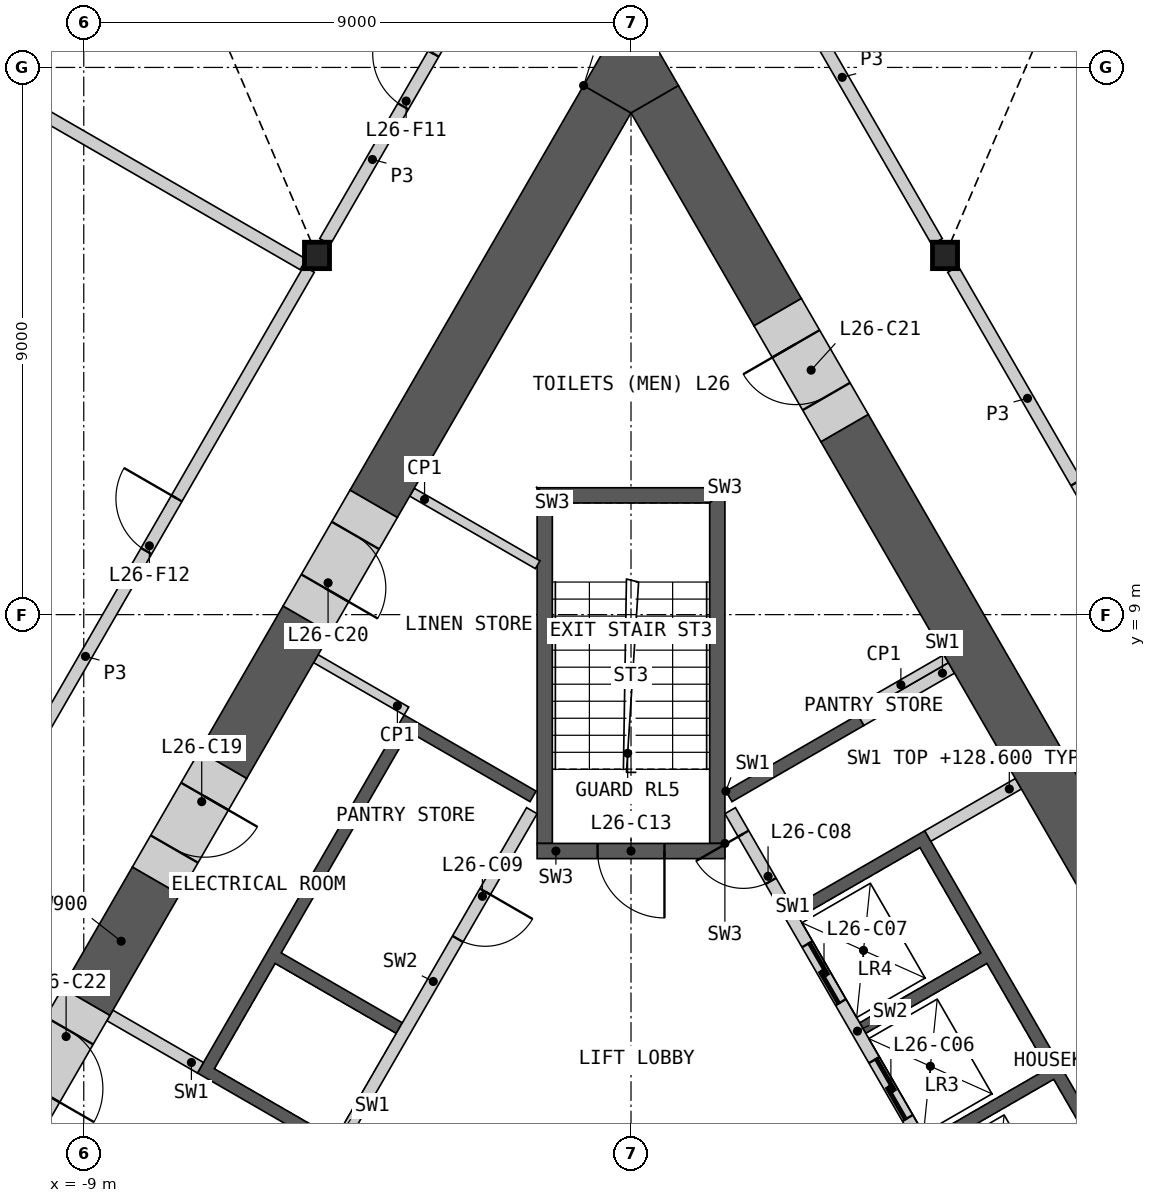
"""IFC4 building model, lengths in metres.
Left out: names, types, materials, properties, quantities, classifications, styles, units other than length and angle.
Written with IfcOpenShell. Run it as: python <this file> out.ifc"""

import sys

from ifc_helpers import new_model, si_unit, direction, frame, frame_2d, origin, origin_2d, place, context, subcontext, project, spatial, polyline, rectangle, i_section, outline, extrude, element, fill, save


model = new_model("IFC4")
c1 = context("Model", 3, precision=1e-05, world=origin(), true_north=direction((0.0, 1.0)))
c2 = subcontext(c1, "Body", "Model", "MODEL_VIEW")
j1 = project(units=[si_unit("LENGTHUNIT", "METRE"), si_unit("PLANEANGLEUNIT", "RADIAN")], contexts=[c1])
p1 = place(None, origin())
s1 = spatial("IfcSite", under=j1, at=p1, CompositionType="ELEMENT")
p2 = place(p1, origin())
s2 = spatial("IfcBuilding", under=s1, at=p2, CompositionType="ELEMENT")
p3 = place(p2, frame((0.0, 0.0, 124.8)))
s3 = spatial("IfcBuildingStorey", under=s2, at=p3, CompositionType="ELEMENT", Elevation=124.8)
for number, where, z_axis, x_axis in (
    (1, (-5.164, 14.908, 0.0), (0.0, 0.0, 1.0), (1.0, 0.0, 0.0)),
    (2, (5.164, 14.908, 0.0), (0.0, 0.0, 1.0), (1.0, 0.0, 0.0)),
):
    element("IfcColumn", number, at=place(p3, frame(where, z_axis=z_axis, x_axis=x_axis)), inside=s3, PredefinedType="COLUMN", context=c2, shape_type="SweptSolid", body=[
        extrude(i_section(OverallWidth=0.412, OverallDepth=0.435, WebThickness=0.036, FlangeThickness=0.057, at=origin_2d()), origin(), (0.0, 0.0, 1.0), 4.2),
    ])
p4 = place(p3, origin())
e3 = element("IfcWall", 3, at=p4, inside=s3, PredefinedType="SHEAR", context=c2, shape_type="SweptSolid", body=[
    extrude(outline(polyline([(1.561, 6.097), (3.731, 7.35), (3.831, 7.177), (1.66, 5.924), (1.561, 6.097)])), origin(), (0.0, 0.0, 1.0), 3.8),
])
p5 = place(p3, origin())
e4 = element("IfcWall", 4, at=p5, inside=s3, PredefinedType="SHEAR", context=c2, shape_type="SweptSolid", body=[
    extrude(outline(polyline([(2.66, 4.192), (4.831, 5.445), (8.231, -0.444), (6.061, -1.697), (5.96, -1.524), (7.952, -0.374), (6.952, 1.358), (4.96, 0.208), (4.861, 0.381), (6.852, 1.531), (5.852, 3.263), (3.861, 2.113), (3.76, 2.287), (5.752, 3.437), (4.752, 5.169), (2.76, 4.019), (2.66, 4.192)])), origin(), (0.0, 0.0, 1.0), 3.8),
])
p6 = place(p3, frame((5.817, -1.476, 0.0), z_axis=(0.0, 0.0, 1.0), x_axis=(-0.500002616675, 0.866023893041, 0.0)))
e5 = element("IfcWall", 5, at=p6, inside=s3, PredefinedType="SOLIDWALL", context=c2, shape_type="SweptSolid", body=[
    extrude(rectangle(XDim=8.373, YDim=0.2, at=frame_2d((4.187, 0.0))), origin(), (0.0, 0.0, 1.0), 3.8),
])
p7 = place(p6, frame((0.337, 0.0, 0.0)))
e6 = element("IfcOpeningElement", 6, at=p7, cuts=e5, PredefinedType="OPENING", context=c2, shape_type="SweptSolid", body=[
    extrude(rectangle(XDim=1.1, YDim=2.1, at=frame_2d((0.55, 1.05))), frame((0.0, 0.11, 0.0), z_axis=(0.0, -1.0, 0.0), x_axis=(1.0, 0.0, 0.0)), (0.0, 0.0, 1.0), 0.22),
])
p8 = place(p6, frame((2.537, 0.0, 0.0)))
e7 = element("IfcOpeningElement", 7, at=p8, cuts=e5, PredefinedType="OPENING", context=c2, shape_type="SweptSolid", body=[
    extrude(rectangle(XDim=1.1, YDim=2.1, at=frame_2d((0.55, 1.05))), frame((0.0, 0.11, 0.0), z_axis=(0.0, -1.0, 0.0), x_axis=(1.0, 0.0, 0.0)), (0.0, 0.0, 1.0), 0.22),
])
p9 = place(p6, frame((4.737, 0.0, 0.0)))
e8 = element("IfcOpeningElement", 8, at=p9, cuts=e5, PredefinedType="OPENING", context=c2, shape_type="SweptSolid", body=[
    extrude(rectangle(XDim=1.1, YDim=2.1, at=frame_2d((0.55, 1.05))), frame((0.0, 0.11, 0.0), z_axis=(0.0, -1.0, 0.0), x_axis=(1.0, 0.0, 0.0)), (0.0, 0.0, 1.0), 0.22),
])
p10 = place(p6, frame((7.037, 0.0, 0.0)))
e9 = element("IfcOpeningElement", 9, at=p10, cuts=e5, PredefinedType="OPENING", context=c2, shape_type="SweptSolid", body=[
    extrude(rectangle(XDim=0.9, YDim=2.1, at=frame_2d((0.45, 1.05))), frame((0.0, 0.11, 0.0), z_axis=(0.0, -1.0, 0.0), x_axis=(1.0, 0.0, 0.0)), (0.0, 0.0, 1.0), 0.22),
])
for number, where, z_axis, x_axis in (
    (10, (4.881, 5.358, 0.0), (0.0, 0.0, 1.0), (0.866, 0.5, 0.0)),
    (11, (3.781, 7.263, 0.0), (0.0, 0.0, 1.0), (0.866, 0.5, 0.0)),
):
    element("IfcWall", number, at=place(p3, frame(where, z_axis=z_axis, x_axis=x_axis)), inside=s3, PredefinedType="SHEAR", context=c2, shape_type="SweptSolid", body=[
        extrude(rectangle(XDim=1.72, YDim=0.2, at=frame_2d((0.86, 0.0))), origin(), (0.0, 0.0, 1.0), 3.8),
    ])
p11 = place(p3, origin())
e12 = element("IfcWall", 12, at=p11, inside=s3, PredefinedType="SHEAR", context=c2, shape_type="SweptSolid", body=[
    extrude(outline(polyline([(-4.96, 0.208), (-7.131, 1.461), (-3.731, 7.35), (-1.561, 6.097), (-1.66, 5.924), (-3.652, 7.074), (-5.752, 3.437), (-3.76, 2.287), (-3.861, 2.113), (-5.852, 3.263), (-6.852, 1.531), (-4.861, 0.381), (-4.96, 0.208)])), origin(), (0.0, 0.0, 1.0), 3.8),
])
p12 = place(p3, frame((-1.631, 5.776, 0.0), z_axis=(0.0, 0.0, 1.0), x_axis=(-0.499992876559, -0.866029516466, 0.0)))
e13 = element("IfcWall", 13, at=p12, inside=s3, PredefinedType="SOLIDWALL", context=c2, shape_type="SweptSolid", body=[
    extrude(rectangle(XDim=6.486, YDim=0.2, at=frame_2d((3.243, 0.0))), origin(), (0.0, 0.0, 1.0), 3.8),
])
p13 = place(p12, frame((1.537, 0.0, 0.0)))
e14 = element("IfcOpeningElement", 14, at=p13, cuts=e13, PredefinedType="OPENING", context=c2, shape_type="SweptSolid", body=[
    extrude(rectangle(XDim=0.9, YDim=2.1, at=frame_2d((0.45, 1.05))), frame((0.0, 0.11, 0.0), z_axis=(0.0, -1.0, 0.0), x_axis=(1.0, 0.0, 0.0)), (0.0, 0.0, 1.0), 0.22),
])
p14 = place(p3, frame((-7.081, 1.548, 0.0), z_axis=(0.0, 0.0, 1.0), x_axis=(-0.865963414263, 0.500107353632, 0.0)))
e15 = element("IfcWall", 15, at=p14, inside=s3, PredefinedType="SHEAR", context=c2, shape_type="SweptSolid", body=[
    extrude(rectangle(XDim=1.72, YDim=0.2, at=frame_2d((0.86, 0.0))), origin(), (0.0, 0.0, 1.0), 3.8),
])
p15 = place(p3, origin())
e16 = element("IfcWall", 16, at=p15, inside=s3, PredefinedType="SHEAR", context=c2, shape_type="SweptSolid", body=[
    extrude(outline(polyline([(1.544, 5.237), (1.544, 11.087), (1.294, 10.837), (1.294, 5.237), (1.544, 5.237)])), origin(), (0.0, 0.0, 1.0), 3.8),
])
p16 = place(p3, origin())
e17 = element("IfcWall", 17, at=p16, inside=s3, PredefinedType="SHEAR", context=c2, shape_type="SweptSolid", body=[
    extrude(outline(polyline([(1.544, 11.087), (-1.544, 11.087), (-1.294, 10.837), (1.294, 10.837), (1.544, 11.087)])), origin(), (0.0, 0.0, 1.0), 3.8),
])
p17 = place(p3, origin())
e18 = element("IfcWall", 18, at=p17, inside=s3, PredefinedType="SHEAR", context=c2, shape_type="SweptSolid", body=[
    extrude(outline(polyline([(-1.294, 10.837), (-1.544, 11.087), (-1.544, 5.237), (-1.294, 5.237), (-1.294, 10.837)])), origin(), (0.0, 0.0, 1.0), 3.8),
])
p18 = place(p3, frame((1.544, 5.112, 0.0), z_axis=(0.0, 0.0, 1.0), x_axis=(-1.0, 0.0, 0.0)))
e19 = element("IfcWall", 19, at=p18, inside=s3, PredefinedType="SHEAR", context=c2, shape_type="SweptSolid", body=[
    extrude(rectangle(XDim=3.088, YDim=0.25, at=frame_2d((1.544, 0.0))), origin(), (0.0, 0.0, 1.0), 3.8),
])
p19 = place(p18, frame((0.994, 0.0, 0.0)))
e20 = element("IfcOpeningElement", 20, at=p19, cuts=e19, PredefinedType="OPENING", context=c2, shape_type="SweptSolid", body=[
    extrude(rectangle(XDim=1.1, YDim=2.1, at=frame_2d((0.55, 1.05))), frame((0.0, 0.135, 0.0), z_axis=(0.0, -1.0, 0.0), x_axis=(1.0, 0.0, 0.0)), (0.0, 0.0, 1.0), 0.27),
])
for number, where, z_axis, x_axis in (
    (21, (3.693, 7.415, 0.0), (0.0, 0.0, 1.0), (0.866, 0.5, 0.0)),
    (22, (-3.693, 7.415, 0.0), (0.0, 0.0, 1.0), (-0.866, 0.5, 0.0)),
):
    element("IfcWall", number, at=place(p3, frame(where, z_axis=z_axis, x_axis=x_axis)), inside=s3, PredefinedType="PARTITIONING", context=c2, shape_type="SweptSolid", body=[
        extrude(rectangle(XDim=1.72, YDim=0.15, at=frame_2d((0.86, 0.0))), origin(), (0.0, 0.0, 1.0), 3.8),
    ])
p20 = place(p3, frame((-3.602, 11.014, 0.0), z_axis=(0.0, 0.0, 1.0), x_axis=(0.866011787705, -0.500023583, 0.0)))
e23 = element("IfcWall", 23, at=p20, inside=s3, PredefinedType="PARTITIONING", context=c2, shape_type="SweptSolid", body=[
    extrude(rectangle(XDim=2.386, YDim=0.15, at=frame_2d((1.193, 0.0))), origin(), (0.0, 0.0, 1.0), 3.8),
])
p21 = place(p3, frame((7.91, 4.451, 0.0), z_axis=(0.0, 0.0, 1.0), x_axis=(-0.500001962043, 0.866024270995, 0.0)))
e24 = element("IfcWall", 24, at=p21, inside=s3, PredefinedType="SHEAR", context=c2, shape_type="SweptSolid", body=[
    extrude(rectangle(XDim=8.796, YDim=0.9, at=frame_2d((4.398, 0.0))), origin(), (0.0, 0.0, 1.0), 3.8),
])
p22 = place(p3, frame((2.413, 13.974, 0.0), z_axis=(0.0, 0.0, 1.0), x_axis=(-0.500046330384, 0.865998653272, 0.0)))
e25 = element("IfcWall", 25, at=p22, inside=s3, PredefinedType="SHEAR", context=c2, shape_type="SweptSolid", body=[
    extrude(rectangle(XDim=4.045, YDim=0.9, at=frame_2d((2.023, 0.0))), origin(), (0.0, 0.0, 1.0), 3.8),
])
p23 = place(p3, frame((-0.39, 17.478, 0.0), z_axis=(0.0, 0.0, 1.0), x_axis=(-0.500010285023, -0.866019465642, 0.0)))
e26 = element("IfcWall", 26, at=p23, inside=s3, PredefinedType="SHEAR", context=c2, shape_type="SweptSolid", body=[
    extrude(rectangle(XDim=7.685, YDim=0.9, at=frame_2d((3.842, 0.0))), origin(), (0.0, 0.0, 1.0), 3.8),
])
p24 = place(p3, frame((-5.332, 8.917, 0.0), z_axis=(0.0, 0.0, 1.0), x_axis=(-0.499949934511, -0.866054307178, 0.0)))
e27 = element("IfcWall", 27, at=p24, inside=s3, PredefinedType="SHEAR", context=c2, shape_type="SweptSolid", body=[
    extrude(rectangle(XDim=2.756, YDim=0.9, at=frame_2d((1.378, 0.0))), origin(), (0.0, 0.0, 1.0), 3.8),
])
p25 = place(p3, frame((-7.81, 4.625, 0.0), z_axis=(0.0, 0.0, 1.0), x_axis=(-0.499952165731, -0.866053019151, 0.0)))
e28 = element("IfcWall", 28, at=p25, inside=s3, PredefinedType="SHEAR", context=c2, shape_type="SweptSolid", body=[
    extrude(rectangle(XDim=2.3, YDim=0.9, at=frame_2d((1.15, 0.0))), origin(), (0.0, 0.0, 1.0), 3.8),
])
p26 = place(p3, origin())
e29 = element("IfcWall", 29, at=p26, inside=s3, PredefinedType="SHEAR", context=c2, shape_type="SweptSolid", body=[
    extrude(outline(polyline([(-0.779, 17.703), (0.0, 19.052), (0.779, 17.703), (0.0, 17.253), (-0.779, 17.703)])), origin(), (0.0, 0.0, 1.0), 3.8),
])
p27 = place(p3, frame((-6.71, 6.53, 0.0), z_axis=(0.0, 0.0, 1.0), x_axis=(-0.50002983664, -0.866008176907, 0.0)))
e30 = element("IfcWall", 30, at=p27, inside=s3, PredefinedType="SHEAR", context=c2, shape_type="SweptSolid", body=[
    extrude(rectangle(XDim=2.2, YDim=0.9, at=frame_2d((1.1, 0.0))), origin(), (0.0, 0.0, 1.0), 3.8),
])
p28 = place(p27, frame((0.6, 0.0, 0.0)))
e31 = element("IfcOpeningElement", 31, at=p28, cuts=e30, PredefinedType="OPENING", context=c2, shape_type="SweptSolid", body=[
    extrude(rectangle(XDim=1.0, YDim=2.1, at=frame_2d((0.5, 1.05))), frame((0.0, 0.46, 0.0), z_axis=(0.0, -1.0, 0.0), x_axis=(1.0, 0.0, 0.0)), (0.0, 0.0, 1.0), 0.92),
])
p29 = place(p3, frame((-4.232, 10.822, 0.0), z_axis=(0.0, 0.0, 1.0), x_axis=(-0.50002983664, -0.866008176907, 0.0)))
e32 = element("IfcWall", 32, at=p29, inside=s3, PredefinedType="SHEAR", context=c2, shape_type="SweptSolid", body=[
    extrude(rectangle(XDim=2.2, YDim=0.9, at=frame_2d((1.1, 0.0))), origin(), (0.0, 0.0, 1.0), 3.8),
])
p30 = place(p29, frame((0.6, 0.0, 0.0)))
e33 = element("IfcOpeningElement", 33, at=p30, cuts=e32, PredefinedType="OPENING", context=c2, shape_type="SweptSolid", body=[
    extrude(rectangle(XDim=1.0, YDim=2.1, at=frame_2d((0.5, 1.05))), frame((0.0, 0.46, 0.0), z_axis=(0.0, -1.0, 0.0), x_axis=(1.0, 0.0, 0.0)), (0.0, 0.0, 1.0), 0.92),
])
p31 = place(p3, frame((3.512, 12.069, 0.0), z_axis=(0.0, 0.0, 1.0), x_axis=(-0.499946605688, 0.86605622881, 0.0)))
e34 = element("IfcWall", 34, at=p31, inside=s3, PredefinedType="SHEAR", context=c2, shape_type="SweptSolid", body=[
    extrude(rectangle(XDim=2.2, YDim=0.9, at=frame_2d((1.1, 0.0))), origin(), (0.0, 0.0, 1.0), 3.8),
])
p32 = place(p31, frame((0.6, 0.0, 0.0)))
e35 = element("IfcOpeningElement", 35, at=p32, cuts=e34, PredefinedType="OPENING", context=c2, shape_type="SweptSolid", body=[
    extrude(rectangle(XDim=1.0, YDim=2.1, at=frame_2d((0.5, 1.05))), frame((0.0, 0.46, 0.0), z_axis=(0.0, -1.0, 0.0), x_axis=(1.0, 0.0, 0.0)), (0.0, 0.0, 1.0), 0.92),
])
p33 = place(p3, frame((-8.96, 2.633, 0.0), z_axis=(0.0, 0.0, 1.0), x_axis=(-0.50002983664, -0.866008176907, 0.0)))
e36 = element("IfcWall", 36, at=p33, inside=s3, PredefinedType="SHEAR", context=c2, shape_type="SweptSolid", body=[
    extrude(rectangle(XDim=2.2, YDim=0.9, at=frame_2d((1.1, 0.0))), origin(), (0.0, 0.0, 1.0), 3.8),
])
p34 = place(p33, frame((0.55, 0.0, 0.0)))
e37 = element("IfcOpeningElement", 37, at=p34, cuts=e36, PredefinedType="OPENING", context=c2, shape_type="SweptSolid", body=[
    extrude(rectangle(XDim=1.1, YDim=2.1, at=frame_2d((0.55, 1.05))), frame((0.0, 0.46, 0.0), z_axis=(0.0, -1.0, 0.0), x_axis=(1.0, 0.0, 0.0)), (0.0, 0.0, 1.0), 0.92),
])
p35 = place(p3, frame((5.295, 14.68, 0.0), z_axis=(0.0, 0.0, 1.0), x_axis=(0.500012035596, -0.866018454918, 0.0)))
e38 = element("IfcWall", 38, at=p35, inside=s3, PredefinedType="PARTITIONING", context=c2, shape_type="SweptSolid", body=[
    extrude(rectangle(XDim=9.803, YDim=0.2, at=frame_2d((4.902, 0.0))), origin(), (0.0, 0.0, 1.0), 3.8),
])
p36 = place(p35, frame((4.052, 0.0, 0.0)))
e39 = element("IfcOpeningElement", 39, at=p36, cuts=e38, PredefinedType="OPENING", context=c2, shape_type="SweptSolid", body=[
    extrude(rectangle(XDim=1.8, YDim=2.1, at=frame_2d((0.9, 1.05))), frame((0.0, 0.11, 0.0), z_axis=(0.0, -1.0, 0.0), x_axis=(1.0, 0.0, 0.0)), (0.0, 0.0, 1.0), 0.22),
])
p37 = place(p3, frame((-10.197, 6.19, 0.0), z_axis=(0.0, 0.0, 1.0), x_axis=(0.500012035596, 0.866018454918, 0.0)))
e40 = element("IfcWall", 40, at=p37, inside=s3, PredefinedType="PARTITIONING", context=c2, shape_type="SweptSolid", body=[
    extrude(rectangle(XDim=9.803, YDim=0.2, at=frame_2d((4.902, 0.0))), origin(), (0.0, 0.0, 1.0), 3.8),
])
p38 = place(p37, frame((4.452, 0.0, 0.0)))
e41 = element("IfcOpeningElement", 41, at=p38, cuts=e40, PredefinedType="OPENING", context=c2, shape_type="SweptSolid", body=[
    extrude(rectangle(XDim=1.0, YDim=2.1, at=frame_2d((0.5, 1.05))), frame((0.0, 0.11, 0.0), z_axis=(0.0, -1.0, 0.0), x_axis=(1.0, 0.0, 0.0)), (0.0, 0.0, 1.0), 0.22),
])
p39 = place(p3, frame((-5.033, 15.135, 0.0), z_axis=(0.0, 0.0, 1.0), x_axis=(0.499980978912, 0.866036385336, 0.0)))
e42 = element("IfcWall", 42, at=p39, inside=s3, PredefinedType="PARTITIONING", context=c2, shape_type="SweptSolid", body=[
    extrude(rectangle(XDim=6.24, YDim=0.2, at=frame_2d((3.12, 0.0))), origin(), (0.0, 0.0, 1.0), 3.8),
])
p40 = place(p39, frame((2.57, 0.0, 0.0)))
e43 = element("IfcOpeningElement", 43, at=p40, cuts=e42, PredefinedType="OPENING", context=c2, shape_type="SweptSolid", body=[
    extrude(rectangle(XDim=1.0, YDim=2.1, at=frame_2d((0.5, 1.05))), frame((0.0, 0.11, 0.0), z_axis=(0.0, -1.0, 0.0), x_axis=(1.0, 0.0, 0.0)), (0.0, 0.0, 1.0), 0.22),
])
p41 = place(p3, frame((1.913, 20.539, 0.0), z_axis=(0.0, 0.0, 1.0), x_axis=(0.499980978912, -0.866036385336, 0.0)))
e44 = element("IfcWall", 44, at=p41, inside=s3, PredefinedType="PARTITIONING", context=c2, shape_type="SweptSolid", body=[
    extrude(rectangle(XDim=6.24, YDim=0.2, at=frame_2d((3.12, 0.0))), origin(), (0.0, 0.0, 1.0), 3.8),
])
p42 = place(p3, frame((-16.436, 21.137, 0.0), z_axis=(0.0, 0.0, 1.0), x_axis=(0.866023321739, -0.500003606191, 0.0)))
e45 = element("IfcWall", 45, at=p42, inside=s3, PredefinedType="PARTITIONING", context=c2, shape_type="SweptSolid", body=[
    extrude(rectangle(XDim=12.753, YDim=0.2, at=frame_2d((6.377, 0.0))), origin(), (0.0, 0.0, 1.0), 2.885),
])
p43 = place(p8, origin())
e46 = element("IfcDoor", 46, at=p43, inside=s3, OperationType="SLIDING_TO_LEFT", PredefinedType="DOOR", context=c2, shape_type="SweptSolid", body=[
    extrude(rectangle(XDim=1.1, YDim=2.1, at=frame_2d((0.55, 1.05))), frame((0.0, 0.025, 0.0), z_axis=(0.0, -1.0, 0.0), x_axis=(1.0, 0.0, 0.0)), (0.0, 0.0, 1.0), 0.05),
])
fill(e7, e46)
p44 = place(p9, origin())
e47 = element("IfcDoor", 47, at=p44, inside=s3, OperationType="SLIDING_TO_LEFT", PredefinedType="DOOR", context=c2, shape_type="SweptSolid", body=[
    extrude(rectangle(XDim=1.1, YDim=2.1, at=frame_2d((0.55, 1.05))), frame((0.0, 0.025, 0.0), z_axis=(0.0, -1.0, 0.0), x_axis=(1.0, 0.0, 0.0)), (0.0, 0.0, 1.0), 0.05),
])
fill(e8, e47)
p45 = place(p10, origin())
e48 = element("IfcDoor", 48, at=p45, inside=s3, OperationType="SINGLE_SWING_RIGHT", PredefinedType="DOOR", context=c2, shape_type="SweptSolid", body=[
    extrude(rectangle(XDim=0.9, YDim=2.1, at=frame_2d((0.45, 1.05))), frame((0.0, 0.025, 0.0), z_axis=(0.0, -1.0, 0.0), x_axis=(1.0, 0.0, 0.0)), (0.0, 0.0, 1.0), 0.05),
])
fill(e9, e48)
p46 = place(p13, origin())
e49 = element("IfcDoor", 49, at=p46, inside=s3, OperationType="SINGLE_SWING_LEFT", PredefinedType="DOOR", context=c2, shape_type="SweptSolid", body=[
    extrude(rectangle(XDim=0.9, YDim=2.1, at=frame_2d((0.45, 1.05))), frame((0.0, 0.025, 0.0), z_axis=(0.0, -1.0, 0.0), x_axis=(1.0, 0.0, 0.0)), (0.0, 0.0, 1.0), 0.05),
])
fill(e14, e49)
p47 = place(p19, origin())
e50 = element("IfcDoor", 50, at=p47, inside=s3, OperationType="SINGLE_SWING_LEFT", PredefinedType="DOOR", context=c2, shape_type="SweptSolid", body=[
    extrude(rectangle(XDim=1.1, YDim=2.1, at=frame_2d((0.55, 1.05))), frame((0.0, 0.025, 0.0), z_axis=(0.0, -1.0, 0.0), x_axis=(1.0, 0.0, 0.0)), (0.0, 0.0, 1.0), 0.05),
])
fill(e20, e50)
p48 = place(p28, origin())
e51 = element("IfcDoor", 51, at=p48, inside=s3, OperationType="SINGLE_SWING_LEFT", PredefinedType="DOOR", context=c2, shape_type="SweptSolid", body=[
    extrude(rectangle(XDim=1.0, YDim=2.1, at=frame_2d((0.5, 1.05))), frame((0.0, 0.205, 0.0), z_axis=(0.0, -1.0, 0.0), x_axis=(1.0, 0.0, 0.0)), (0.0, 0.0, 1.0), 0.05),
])
fill(e31, e51)
p49 = place(p30, origin())
e52 = element("IfcDoor", 52, at=p49, inside=s3, OperationType="SINGLE_SWING_RIGHT", PredefinedType="DOOR", context=c2, shape_type="SweptSolid", body=[
    extrude(rectangle(XDim=1.0, YDim=2.1, at=frame_2d((0.5, 1.05))), frame((0.0, 0.205, 0.0), z_axis=(0.0, -1.0, 0.0), x_axis=(1.0, 0.0, 0.0)), (0.0, 0.0, 1.0), 0.05),
])
fill(e33, e52)
p50 = place(p32, origin())
e53 = element("IfcDoor", 53, at=p50, inside=s3, OperationType="SINGLE_SWING_RIGHT", PredefinedType="DOOR", context=c2, shape_type="SweptSolid", body=[
    extrude(rectangle(XDim=1.0, YDim=2.1, at=frame_2d((0.5, 1.05))), frame((0.0, 0.205, 0.0), z_axis=(0.0, -1.0, 0.0), x_axis=(1.0, 0.0, 0.0)), (0.0, 0.0, 1.0), 0.05),
])
fill(e35, e53)
p51 = place(p34, origin())
e54 = element("IfcDoor", 54, at=p51, inside=s3, OperationType="SINGLE_SWING_RIGHT", PredefinedType="DOOR", context=c2, shape_type="SweptSolid", body=[
    extrude(rectangle(XDim=1.1, YDim=2.1, at=frame_2d((0.55, 1.05))), frame((0.0, 0.205, 0.0), z_axis=(0.0, -1.0, 0.0), x_axis=(1.0, 0.0, 0.0)), (0.0, 0.0, 1.0), 0.05),
])
fill(e37, e54)
p52 = place(p36, origin())
e55 = element("IfcDoor", 55, at=p52, inside=s3, OperationType="DOUBLE_DOOR_SINGLE_SWING", PredefinedType="DOOR", context=c2, shape_type="SweptSolid", body=[
    extrude(rectangle(XDim=1.8, YDim=2.1, at=frame_2d((0.9, 1.05))), frame((0.0, 0.025, 0.0), z_axis=(0.0, -1.0, 0.0), x_axis=(1.0, 0.0, 0.0)), (0.0, 0.0, 1.0), 0.05),
])
fill(e39, e55)
p53 = place(p40, origin())
e56 = element("IfcDoor", 56, at=p53, inside=s3, OperationType="SINGLE_SWING_RIGHT", PredefinedType="DOOR", context=c2, shape_type="SweptSolid", body=[
    extrude(rectangle(XDim=1.0, YDim=2.1, at=frame_2d((0.5, 1.05))), frame((0.0, 0.025, 0.0), z_axis=(0.0, -1.0, 0.0), x_axis=(1.0, 0.0, 0.0)), (0.0, 0.0, 1.0), 0.05),
])
fill(e43, e56)
p54 = place(p38, origin())
e57 = element("IfcDoor", 57, at=p54, inside=s3, OperationType="SINGLE_SWING_RIGHT", PredefinedType="DOOR", context=c2, shape_type="SweptSolid", body=[
    extrude(rectangle(XDim=1.0, YDim=2.1, at=frame_2d((0.5, 1.05))), frame((0.0, 0.025, 0.0), z_axis=(0.0, -1.0, 0.0), x_axis=(1.0, 0.0, 0.0)), (0.0, 0.0, 1.0), 0.05),
])
fill(e41, e57)
save(model, sys.argv[1])
